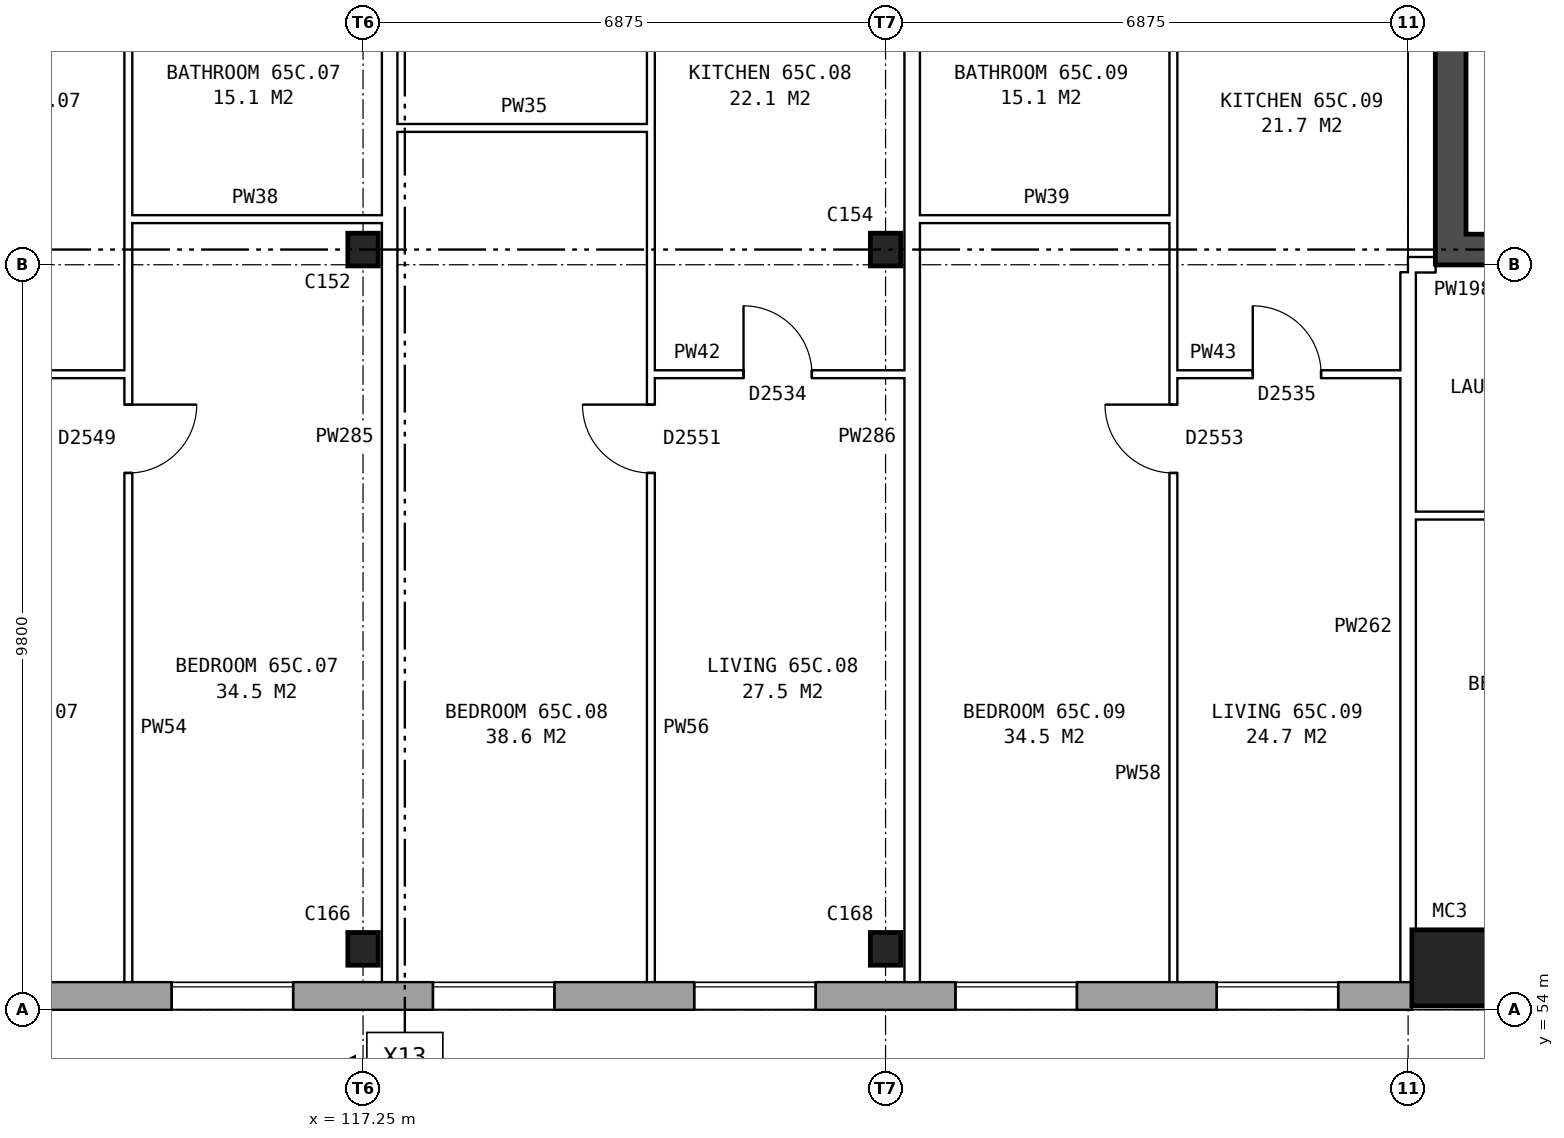
"""IFC4 building model, lengths in metres.
Left out: names, types, materials, properties, quantities, classifications, styles, units other than length and angle.
Written with IfcOpenShell. Run it as: python <this file> out.ifc"""

import sys

from ifc_helpers import new_model, si_unit, direction, frame, frame_2d, origin, origin_2d, place, context, subcontext, project, spatial, rectangle, hollow_rectangle, i_section, extrude, element, fill, save


model = new_model("IFC4")
c1 = context("Model", 3, precision=1e-05, world=origin(), true_north=direction((0.0, 1.0)))
c2 = subcontext(c1, "Body", "Model", "MODEL_VIEW")
j1 = project(units=[si_unit("LENGTHUNIT", "METRE"), si_unit("PLANEANGLEUNIT", "RADIAN")], contexts=[c1])
p1 = place(None, origin())
s1 = spatial("IfcSite", under=j1, at=p1, CompositionType="ELEMENT")
p2 = place(p1, origin())
s2 = spatial("IfcBuilding", under=s1, at=p2, CompositionType="ELEMENT")
p3 = place(p2, frame((0.0, 0.0, 230.7)))
s3 = spatial("IfcBuildingStorey", under=s2, at=p3, CompositionType="ELEMENT", Elevation=230.7)
p4 = place(p3, frame((131.55, 54.55, 0.0), z_axis=(0.0, 0.0, 1.0), x_axis=(1.0, 0.0, 0.0)))
e1 = element("IfcColumn", 1, at=p4, inside=s3, PredefinedType="COLUMN", context=c2, shape_type="SweptSolid", body=[
    extrude(hollow_rectangle(XDim=1.0, YDim=1.0, WallThickness=0.055, at=origin_2d()), origin(), (0.0, 0.0, 1.0), 3.1),
])
for number, where, z_axis, x_axis in (
    (2, (117.25, 54.8, 0.0), (0.0, 0.0, 1.0), (1.0, 0.0, 0.0)),
    (3, (124.125, 54.8, 0.0), (0.0, 0.0, 1.0), (1.0, 0.0, 0.0)),
    (4, (117.25, 64.0, 0.0), (0.0, 0.0, 1.0), (1.0, 0.0, 0.0)),
    (5, (124.125, 64.0, 0.0), (0.0, 0.0, 1.0), (1.0, 0.0, 0.0)),
):
    element("IfcColumn", number, at=place(p3, frame(where, z_axis=z_axis, x_axis=x_axis)), inside=s3, PredefinedType="COLUMN", context=c2, shape_type="SweptSolid", body=[
        extrude(i_section(OverallWidth=0.4, OverallDepth=0.43, WebThickness=0.028, FlangeThickness=0.04, at=origin_2d()), origin(), (0.0, 0.0, 1.0), 2.85),
    ])
p5 = place(p3, frame((75.95, 54.18, 0.0), z_axis=(0.0, 0.0, 1.0), x_axis=(1.0, 0.0, 0.0)))
e6 = element("IfcWall", 6, at=p5, inside=s3, PredefinedType="STANDARD", context=c2, shape_type="SweptSolid", body=[
    extrude(rectangle(XDim=55.1, YDim=0.36, at=frame_2d((27.55, 0.0))), origin(), (0.0, 0.0, 1.0), 2.85),
])
p6 = place(p5, frame((0.969, 0.0, 0.8)))
e7 = element("IfcOpeningElement", 7, at=p6, cuts=e6, PredefinedType="OPENING", context=c2, shape_type="SweptSolid", body=[
    extrude(rectangle(XDim=1.6, YDim=1.8, at=frame_2d((0.8, 0.9))), frame((0.0, 0.19, 0.0), z_axis=(0.0, -1.0, 0.0), x_axis=(1.0, 0.0, 0.0)), (0.0, 0.0, 1.0), 0.38),
])
p7 = place(p5, frame((4.406, 0.0, 0.8)))
e8 = element("IfcOpeningElement", 8, at=p7, cuts=e6, PredefinedType="OPENING", context=c2, shape_type="SweptSolid", body=[
    extrude(rectangle(XDim=1.6, YDim=1.8, at=frame_2d((0.8, 0.9))), frame((0.0, 0.19, 0.0), z_axis=(0.0, -1.0, 0.0), x_axis=(1.0, 0.0, 0.0)), (0.0, 0.0, 1.0), 0.38),
])
p8 = place(p5, frame((7.844, 0.0, 0.8)))
e9 = element("IfcOpeningElement", 9, at=p8, cuts=e6, PredefinedType="OPENING", context=c2, shape_type="SweptSolid", body=[
    extrude(rectangle(XDim=1.6, YDim=1.8, at=frame_2d((0.8, 0.9))), frame((0.0, 0.19, 0.0), z_axis=(0.0, -1.0, 0.0), x_axis=(1.0, 0.0, 0.0)), (0.0, 0.0, 1.0), 0.38),
])
p9 = place(p5, frame((11.281, 0.0, 0.8)))
e10 = element("IfcOpeningElement", 10, at=p9, cuts=e6, PredefinedType="OPENING", context=c2, shape_type="SweptSolid", body=[
    extrude(rectangle(XDim=1.6, YDim=1.8, at=frame_2d((0.8, 0.9))), frame((0.0, 0.19, 0.0), z_axis=(0.0, -1.0, 0.0), x_axis=(1.0, 0.0, 0.0)), (0.0, 0.0, 1.0), 0.38),
])
p10 = place(p5, frame((14.719, 0.0, 0.8)))
e11 = element("IfcOpeningElement", 11, at=p10, cuts=e6, PredefinedType="OPENING", context=c2, shape_type="SweptSolid", body=[
    extrude(rectangle(XDim=1.6, YDim=1.8, at=frame_2d((0.8, 0.9))), frame((0.0, 0.19, 0.0), z_axis=(0.0, -1.0, 0.0), x_axis=(1.0, 0.0, 0.0)), (0.0, 0.0, 1.0), 0.38),
])
p11 = place(p5, frame((18.156, 0.0, 0.8)))
e12 = element("IfcOpeningElement", 12, at=p11, cuts=e6, PredefinedType="OPENING", context=c2, shape_type="SweptSolid", body=[
    extrude(rectangle(XDim=1.6, YDim=1.8, at=frame_2d((0.8, 0.9))), frame((0.0, 0.19, 0.0), z_axis=(0.0, -1.0, 0.0), x_axis=(1.0, 0.0, 0.0)), (0.0, 0.0, 1.0), 0.38),
])
p12 = place(p5, frame((21.594, 0.0, 0.8)))
e13 = element("IfcOpeningElement", 13, at=p12, cuts=e6, PredefinedType="OPENING", context=c2, shape_type="SweptSolid", body=[
    extrude(rectangle(XDim=1.6, YDim=1.8, at=frame_2d((0.8, 0.9))), frame((0.0, 0.19, 0.0), z_axis=(0.0, -1.0, 0.0), x_axis=(1.0, 0.0, 0.0)), (0.0, 0.0, 1.0), 0.38),
])
p13 = place(p5, frame((25.031, 0.0, 0.8)))
e14 = element("IfcOpeningElement", 14, at=p13, cuts=e6, PredefinedType="OPENING", context=c2, shape_type="SweptSolid", body=[
    extrude(rectangle(XDim=1.6, YDim=1.8, at=frame_2d((0.8, 0.9))), frame((0.0, 0.19, 0.0), z_axis=(0.0, -1.0, 0.0), x_axis=(1.0, 0.0, 0.0)), (0.0, 0.0, 1.0), 0.38),
])
p14 = place(p5, frame((28.469, 0.0, 0.8)))
e15 = element("IfcOpeningElement", 15, at=p14, cuts=e6, PredefinedType="OPENING", context=c2, shape_type="SweptSolid", body=[
    extrude(rectangle(XDim=1.6, YDim=1.8, at=frame_2d((0.8, 0.9))), frame((0.0, 0.19, 0.0), z_axis=(0.0, -1.0, 0.0), x_axis=(1.0, 0.0, 0.0)), (0.0, 0.0, 1.0), 0.38),
])
p15 = place(p5, frame((31.906, 0.0, 0.8)))
e16 = element("IfcOpeningElement", 16, at=p15, cuts=e6, PredefinedType="OPENING", context=c2, shape_type="SweptSolid", body=[
    extrude(rectangle(XDim=1.6, YDim=1.8, at=frame_2d((0.8, 0.9))), frame((0.0, 0.19, 0.0), z_axis=(0.0, -1.0, 0.0), x_axis=(1.0, 0.0, 0.0)), (0.0, 0.0, 1.0), 0.38),
])
p16 = place(p5, frame((35.344, 0.0, 0.8)))
e17 = element("IfcOpeningElement", 17, at=p16, cuts=e6, PredefinedType="OPENING", context=c2, shape_type="SweptSolid", body=[
    extrude(rectangle(XDim=1.6, YDim=1.8, at=frame_2d((0.8, 0.9))), frame((0.0, 0.19, 0.0), z_axis=(0.0, -1.0, 0.0), x_axis=(1.0, 0.0, 0.0)), (0.0, 0.0, 1.0), 0.38),
])
p17 = place(p5, frame((38.781, 0.0, 0.8)))
e18 = element("IfcOpeningElement", 18, at=p17, cuts=e6, PredefinedType="OPENING", context=c2, shape_type="SweptSolid", body=[
    extrude(rectangle(XDim=1.6, YDim=1.8, at=frame_2d((0.8, 0.9))), frame((0.0, 0.19, 0.0), z_axis=(0.0, -1.0, 0.0), x_axis=(1.0, 0.0, 0.0)), (0.0, 0.0, 1.0), 0.38),
])
p18 = place(p5, frame((42.219, 0.0, 0.8)))
e19 = element("IfcOpeningElement", 19, at=p18, cuts=e6, PredefinedType="OPENING", context=c2, shape_type="SweptSolid", body=[
    extrude(rectangle(XDim=1.6, YDim=1.8, at=frame_2d((0.8, 0.9))), frame((0.0, 0.19, 0.0), z_axis=(0.0, -1.0, 0.0), x_axis=(1.0, 0.0, 0.0)), (0.0, 0.0, 1.0), 0.38),
])
p19 = place(p5, frame((45.656, 0.0, 0.8)))
e20 = element("IfcOpeningElement", 20, at=p19, cuts=e6, PredefinedType="OPENING", context=c2, shape_type="SweptSolid", body=[
    extrude(rectangle(XDim=1.6, YDim=1.8, at=frame_2d((0.8, 0.9))), frame((0.0, 0.19, 0.0), z_axis=(0.0, -1.0, 0.0), x_axis=(1.0, 0.0, 0.0)), (0.0, 0.0, 1.0), 0.38),
])
p20 = place(p5, frame((49.094, 0.0, 0.8)))
e21 = element("IfcOpeningElement", 21, at=p20, cuts=e6, PredefinedType="OPENING", context=c2, shape_type="SweptSolid", body=[
    extrude(rectangle(XDim=1.6, YDim=1.8, at=frame_2d((0.8, 0.9))), frame((0.0, 0.19, 0.0), z_axis=(0.0, -1.0, 0.0), x_axis=(1.0, 0.0, 0.0)), (0.0, 0.0, 1.0), 0.38),
])
p21 = place(p5, frame((52.531, 0.0, 0.8)))
e22 = element("IfcOpeningElement", 22, at=p21, cuts=e6, PredefinedType="OPENING", context=c2, shape_type="SweptSolid", body=[
    extrude(rectangle(XDim=1.6, YDim=1.8, at=frame_2d((0.8, 0.9))), frame((0.0, 0.19, 0.0), z_axis=(0.0, -1.0, 0.0), x_axis=(1.0, 0.0, 0.0)), (0.0, 0.0, 1.0), 0.38),
])
p22 = place(p3, frame((131.56, 63.8, 0.0), z_axis=(0.0, 0.0, 1.0), x_axis=(0.0, 1.0, 0.0)))
e23 = element("IfcWall", 23, at=p22, inside=s3, PredefinedType="SHEAR", context=c2, shape_type="SweptSolid", body=[
    extrude(rectangle(XDim=12.4, YDim=0.4, at=frame_2d((6.2, 0.0))), origin(), (0.0, 0.0, 1.0), 2.85),
])
p23 = place(p22, frame((9.8, 0.0, 0.0)))
e24 = element("IfcOpeningElement", 24, at=p23, cuts=e23, PredefinedType="OPENING", context=c2, shape_type="SweptSolid", body=[
    extrude(rectangle(XDim=1.1, YDim=2.1, at=frame_2d((0.55, 1.05))), frame((0.0, 0.21, 0.0), z_axis=(0.0, -1.0, 0.0), x_axis=(1.0, 0.0, 0.0)), (0.0, 0.0, 1.0), 0.42),
])
p24 = place(p3, frame((139.36, 64.0, 0.0), z_axis=(0.0, 0.0, 1.0), x_axis=(-1.0, 0.0, 0.0)))
e25 = element("IfcWall", 25, at=p24, inside=s3, PredefinedType="SHEAR", context=c2, shape_type="SweptSolid", body=[
    extrude(rectangle(XDim=7.6, YDim=0.4, at=frame_2d((3.8, 0.0))), origin(), (0.0, 0.0, 1.0), 2.85),
])
p25 = place(p3, frame((131.1, 60.5, 0.0), z_axis=(0.0, 0.0, 1.0), x_axis=(1.0, 0.0, 0.0)))
e26 = element("IfcWall", 26, at=p25, inside=s3, PredefinedType="PARTITIONING", context=c2, shape_type="SweptSolid", body=[
    extrude(rectangle(XDim=5.8, YDim=0.1, at=frame_2d((2.9, 0.0))), origin(), (0.0, 0.0, 1.0), 2.85),
])
p26 = place(p3, frame((110.825, 62.36, 0.0), z_axis=(0.0, 0.0, 1.0), x_axis=(1.0, 0.0, 0.0)))
e27 = element("IfcWall", 27, at=p26, inside=s3, PredefinedType="PARTITIONING", context=c2, shape_type="SweptSolid", body=[
    extrude(rectangle(XDim=3.337, YDim=0.1, at=frame_2d((1.668, 0.0))), origin(), (0.0, 0.0, 1.0), 2.85),
])
p27 = place(p26, frame((1.219, 0.0, 0.0)))
e28 = element("IfcOpeningElement", 28, at=p27, cuts=e27, PredefinedType="OPENING", context=c2, shape_type="SweptSolid", body=[
    extrude(rectangle(XDim=0.9, YDim=2.1, at=frame_2d((0.45, 1.05))), frame((0.0, 0.06, 0.0), z_axis=(0.0, -1.0, 0.0), x_axis=(1.0, 0.0, 0.0)), (0.0, 0.0, 1.0), 0.12),
])
p28 = place(p3, frame((121.037, 62.36, 0.0), z_axis=(0.0, 0.0, 1.0), x_axis=(1.0, 0.0, 0.0)))
e29 = element("IfcWall", 29, at=p28, inside=s3, PredefinedType="PARTITIONING", context=c2, shape_type="SweptSolid", body=[
    extrude(rectangle(XDim=3.338, YDim=0.1, at=frame_2d((1.669, 0.0))), origin(), (0.0, 0.0, 1.0), 2.85),
])
p29 = place(p28, frame((1.219, 0.0, 0.0)))
e30 = element("IfcOpeningElement", 30, at=p29, cuts=e29, PredefinedType="OPENING", context=c2, shape_type="SweptSolid", body=[
    extrude(rectangle(XDim=0.9, YDim=2.1, at=frame_2d((0.45, 1.05))), frame((0.0, 0.06, 0.0), z_axis=(0.0, -1.0, 0.0), x_axis=(1.0, 0.0, 0.0)), (0.0, 0.0, 1.0), 0.12),
])
p30 = place(p3, frame((127.912, 62.36, 0.0), z_axis=(0.0, 0.0, 1.0), x_axis=(1.0, 0.0, 0.0)))
e31 = element("IfcWall", 31, at=p30, inside=s3, PredefinedType="PARTITIONING", context=c2, shape_type="SweptSolid", body=[
    extrude(rectangle(XDim=2.988, YDim=0.1, at=frame_2d((1.494, 0.0))), origin(), (0.0, 0.0, 1.0), 2.85),
])
p31 = place(p30, frame((1.044, 0.0, 0.0)))
e32 = element("IfcOpeningElement", 32, at=p31, cuts=e31, PredefinedType="OPENING", context=c2, shape_type="SweptSolid", body=[
    extrude(rectangle(XDim=0.9, YDim=2.1, at=frame_2d((0.45, 1.05))), frame((0.0, 0.06, 0.0), z_axis=(0.0, -1.0, 0.0), x_axis=(1.0, 0.0, 0.0)), (0.0, 0.0, 1.0), 0.12),
])
p32 = place(p3, frame((131.0, 63.8, 0.0), z_axis=(0.0, 0.0, 1.0), x_axis=(1.0, 0.0, 0.0)))
e33 = element("IfcWall", 33, at=p32, inside=s3, PredefinedType="PARTITIONING", context=c2, shape_type="SweptSolid", body=[
    extrude(rectangle(XDim=0.36, YDim=0.2, at=frame_2d((0.18, 0.0))), origin(), (0.0, 0.0, 1.0), 2.85),
])
p33 = place(p3, frame((114.162, 64.4, 0.0), z_axis=(0.0, 0.0, 1.0), x_axis=(1.0, 0.0, 0.0)))
e34 = element("IfcWall", 34, at=p33, inside=s3, PredefinedType="PARTITIONING", context=c2, shape_type="SweptSolid", body=[
    extrude(rectangle(XDim=3.338, YDim=0.1, at=frame_2d((1.669, 0.0))), origin(), (0.0, 0.0, 1.0), 2.85),
])
for number, where, z_axis, x_axis in (
    (35, (124.575, 64.4, 0.0), (0.0, 0.0, 1.0), (1.0, 0.0, 0.0)),
    (36, (117.7, 65.6, 0.0), (0.0, 0.0, 1.0), (1.0, 0.0, 0.0)),
):
    element("IfcWall", number, at=place(p3, frame(where, z_axis=z_axis, x_axis=x_axis)), inside=s3, PredefinedType="PARTITIONING", context=c2, shape_type="SweptSolid", body=[
        extrude(rectangle(XDim=3.337, YDim=0.1, at=frame_2d((1.668, 0.0))), origin(), (0.0, 0.0, 1.0), 2.85),
    ])
p34 = place(p3, frame((114.162, 54.36, 0.0), z_axis=(0.0, 0.0, 1.0), x_axis=(0.0, 1.0, 0.0)))
e37 = element("IfcWall", 37, at=p34, inside=s3, PredefinedType="PARTITIONING", context=c2, shape_type="SweptSolid", body=[
    extrude(rectangle(XDim=14.34, YDim=0.1, at=frame_2d((7.17, 0.0))), origin(), (0.0, 0.0, 1.0), 2.85),
])
p35 = place(p34, frame((6.7, 0.0, 0.0)))
e38 = element("IfcOpeningElement", 38, at=p35, cuts=e37, PredefinedType="OPENING", context=c2, shape_type="SweptSolid", body=[
    extrude(rectangle(XDim=0.9, YDim=2.1, at=frame_2d((0.45, 1.05))), frame((0.0, 0.06, 0.0), z_axis=(0.0, -1.0, 0.0), x_axis=(1.0, 0.0, 0.0)), (0.0, 0.0, 1.0), 0.12),
])
p36 = place(p34, frame((13.04, 0.0, 0.0)))
e39 = element("IfcOpeningElement", 39, at=p36, cuts=e37, PredefinedType="OPENING", context=c2, shape_type="SweptSolid", body=[
    extrude(rectangle(XDim=0.9, YDim=2.1, at=frame_2d((0.45, 1.05))), frame((0.0, 0.06, 0.0), z_axis=(0.0, -1.0, 0.0), x_axis=(1.0, 0.0, 0.0)), (0.0, 0.0, 1.0), 0.12),
])
p37 = place(p3, frame((117.6, 54.36, 0.0), z_axis=(0.0, 0.0, 1.0), x_axis=(0.0, 1.0, 0.0)))
e40 = element("IfcWall", 40, at=p37, inside=s3, PredefinedType="PARTITIONING", context=c2, shape_type="SweptSolid", body=[
    extrude(rectangle(XDim=14.34, YDim=0.2, at=frame_2d((7.17, 0.0))), origin(), (0.0, 0.0, 1.0), 2.85),
])
p38 = place(p3, frame((121.037, 54.36, 0.0), z_axis=(0.0, 0.0, 1.0), x_axis=(0.0, 1.0, 0.0)))
e41 = element("IfcWall", 41, at=p38, inside=s3, PredefinedType="PARTITIONING", context=c2, shape_type="SweptSolid", body=[
    extrude(rectangle(XDim=14.34, YDim=0.1, at=frame_2d((7.17, 0.0))), origin(), (0.0, 0.0, 1.0), 2.85),
])
p39 = place(p38, frame((6.7, 0.0, 0.0)))
e42 = element("IfcOpeningElement", 42, at=p39, cuts=e41, PredefinedType="OPENING", context=c2, shape_type="SweptSolid", body=[
    extrude(rectangle(XDim=0.9, YDim=2.1, at=frame_2d((0.45, 1.05))), frame((0.0, 0.06, 0.0), z_axis=(0.0, -1.0, 0.0), x_axis=(1.0, 0.0, 0.0)), (0.0, 0.0, 1.0), 0.12),
])
p40 = place(p38, frame((13.04, 0.0, 0.0)))
e43 = element("IfcOpeningElement", 43, at=p40, cuts=e41, PredefinedType="OPENING", context=c2, shape_type="SweptSolid", body=[
    extrude(rectangle(XDim=0.9, YDim=2.1, at=frame_2d((0.45, 1.05))), frame((0.0, 0.06, 0.0), z_axis=(0.0, -1.0, 0.0), x_axis=(1.0, 0.0, 0.0)), (0.0, 0.0, 1.0), 0.12),
])
p41 = place(p3, frame((124.475, 54.36, 0.0), z_axis=(0.0, 0.0, 1.0), x_axis=(0.0, 1.0, 0.0)))
e44 = element("IfcWall", 44, at=p41, inside=s3, PredefinedType="PARTITIONING", context=c2, shape_type="SweptSolid", body=[
    extrude(rectangle(XDim=14.34, YDim=0.2, at=frame_2d((7.17, 0.0))), origin(), (0.0, 0.0, 1.0), 2.85),
])
p42 = place(p3, frame((127.912, 54.36, 0.0), z_axis=(0.0, 0.0, 1.0), x_axis=(0.0, 1.0, 0.0)))
e45 = element("IfcWall", 45, at=p42, inside=s3, PredefinedType="PARTITIONING", context=c2, shape_type="SweptSolid", body=[
    extrude(rectangle(XDim=14.34, YDim=0.1, at=frame_2d((7.17, 0.0))), origin(), (0.0, 0.0, 1.0), 2.85),
])
p43 = place(p42, frame((6.7, 0.0, 0.0)))
e46 = element("IfcOpeningElement", 46, at=p43, cuts=e45, PredefinedType="OPENING", context=c2, shape_type="SweptSolid", body=[
    extrude(rectangle(XDim=0.9, YDim=2.1, at=frame_2d((0.45, 1.05))), frame((0.0, 0.06, 0.0), z_axis=(0.0, -1.0, 0.0), x_axis=(1.0, 0.0, 0.0)), (0.0, 0.0, 1.0), 0.12),
])
p44 = place(p42, frame((13.04, 0.0, 0.0)))
e47 = element("IfcOpeningElement", 47, at=p44, cuts=e45, PredefinedType="OPENING", context=c2, shape_type="SweptSolid", body=[
    extrude(rectangle(XDim=0.9, YDim=2.1, at=frame_2d((0.45, 1.05))), frame((0.0, 0.06, 0.0), z_axis=(0.0, -1.0, 0.0), x_axis=(1.0, 0.0, 0.0)), (0.0, 0.0, 1.0), 0.12),
])
p45 = place(p3, frame((131.0, 54.36, 0.0), z_axis=(0.0, 0.0, 1.0), x_axis=(0.0, 1.0, 0.0)))
e48 = element("IfcWall", 48, at=p45, inside=s3, PredefinedType="PARTITIONING", context=c2, shape_type="SweptSolid", body=[
    extrude(rectangle(XDim=9.34, YDim=0.2, at=frame_2d((4.67, 0.0))), origin(), (0.0, 0.0, 1.0), 2.85),
])
p46 = place(p17, origin())
e49 = element("IfcWindow", 49, at=p46, inside=s3, PartitioningType="SINGLE_PANEL", PredefinedType="WINDOW", context=c2, shape_type="SweptSolid", body=[
    extrude(rectangle(XDim=1.6, YDim=1.8, at=frame_2d((0.8, 0.9))), frame((0.0, 0.15, 0.0), z_axis=(0.0, -1.0, 0.0), x_axis=(1.0, 0.0, 0.0)), (0.0, 0.0, 1.0), 0.06),
])
fill(e18, e49)
p47 = place(p18, origin())
e50 = element("IfcWindow", 50, at=p47, inside=s3, PartitioningType="SINGLE_PANEL", PredefinedType="WINDOW", context=c2, shape_type="SweptSolid", body=[
    extrude(rectangle(XDim=1.6, YDim=1.8, at=frame_2d((0.8, 0.9))), frame((0.0, 0.15, 0.0), z_axis=(0.0, -1.0, 0.0), x_axis=(1.0, 0.0, 0.0)), (0.0, 0.0, 1.0), 0.06),
])
fill(e19, e50)
p48 = place(p19, origin())
e51 = element("IfcWindow", 51, at=p48, inside=s3, PartitioningType="SINGLE_PANEL", PredefinedType="WINDOW", context=c2, shape_type="SweptSolid", body=[
    extrude(rectangle(XDim=1.6, YDim=1.8, at=frame_2d((0.8, 0.9))), frame((0.0, 0.15, 0.0), z_axis=(0.0, -1.0, 0.0), x_axis=(1.0, 0.0, 0.0)), (0.0, 0.0, 1.0), 0.06),
])
fill(e20, e51)
p49 = place(p20, origin())
e52 = element("IfcWindow", 52, at=p49, inside=s3, PartitioningType="SINGLE_PANEL", PredefinedType="WINDOW", context=c2, shape_type="SweptSolid", body=[
    extrude(rectangle(XDim=1.6, YDim=1.8, at=frame_2d((0.8, 0.9))), frame((0.0, 0.15, 0.0), z_axis=(0.0, -1.0, 0.0), x_axis=(1.0, 0.0, 0.0)), (0.0, 0.0, 1.0), 0.06),
])
fill(e21, e52)
p50 = place(p21, origin())
e53 = element("IfcWindow", 53, at=p50, inside=s3, PartitioningType="SINGLE_PANEL", PredefinedType="WINDOW", context=c2, shape_type="SweptSolid", body=[
    extrude(rectangle(XDim=1.6, YDim=1.8, at=frame_2d((0.8, 0.9))), frame((0.0, 0.15, 0.0), z_axis=(0.0, -1.0, 0.0), x_axis=(1.0, 0.0, 0.0)), (0.0, 0.0, 1.0), 0.06),
])
fill(e22, e53)
p51 = place(p35, frame((0.9, 0.0, 0.0), z_axis=(0.0, 0.0, 1.0), x_axis=(-1.0, 0.0, 0.0)))
e54 = element("IfcDoor", 54, at=p51, inside=s3, OperationType="SINGLE_SWING_LEFT", PredefinedType="DOOR", context=c2, shape_type="SweptSolid", body=[
    extrude(rectangle(XDim=0.9, YDim=2.1, at=frame_2d((0.45, 1.05))), frame((0.0, 0.025, 0.0), z_axis=(0.0, -1.0, 0.0), x_axis=(1.0, 0.0, 0.0)), (0.0, 0.0, 1.0), 0.05),
])
fill(e38, e54)
p52 = place(p39, origin())
e55 = element("IfcDoor", 55, at=p52, inside=s3, OperationType="SINGLE_SWING_RIGHT", PredefinedType="DOOR", context=c2, shape_type="SweptSolid", body=[
    extrude(rectangle(XDim=0.9, YDim=2.1, at=frame_2d((0.45, 1.05))), frame((0.0, 0.025, 0.0), z_axis=(0.0, -1.0, 0.0), x_axis=(1.0, 0.0, 0.0)), (0.0, 0.0, 1.0), 0.05),
])
fill(e42, e55)
p53 = place(p29, origin())
e56 = element("IfcDoor", 56, at=p53, inside=s3, OperationType="SINGLE_SWING_LEFT", PredefinedType="DOOR", context=c2, shape_type="SweptSolid", body=[
    extrude(rectangle(XDim=0.9, YDim=2.1, at=frame_2d((0.45, 1.05))), frame((0.0, 0.025, 0.0), z_axis=(0.0, -1.0, 0.0), x_axis=(1.0, 0.0, 0.0)), (0.0, 0.0, 1.0), 0.05),
])
fill(e30, e56)
p54 = place(p43, origin())
e57 = element("IfcDoor", 57, at=p54, inside=s3, OperationType="SINGLE_SWING_RIGHT", PredefinedType="DOOR", context=c2, shape_type="SweptSolid", body=[
    extrude(rectangle(XDim=0.9, YDim=2.1, at=frame_2d((0.45, 1.05))), frame((0.0, 0.025, 0.0), z_axis=(0.0, -1.0, 0.0), x_axis=(1.0, 0.0, 0.0)), (0.0, 0.0, 1.0), 0.05),
])
fill(e46, e57)
p55 = place(p31, origin())
e58 = element("IfcDoor", 58, at=p55, inside=s3, OperationType="SINGLE_SWING_LEFT", PredefinedType="DOOR", context=c2, shape_type="SweptSolid", body=[
    extrude(rectangle(XDim=0.9, YDim=2.1, at=frame_2d((0.45, 1.05))), frame((0.0, 0.025, 0.0), z_axis=(0.0, -1.0, 0.0), x_axis=(1.0, 0.0, 0.0)), (0.0, 0.0, 1.0), 0.05),
])
fill(e32, e58)
save(model, sys.argv[1])
